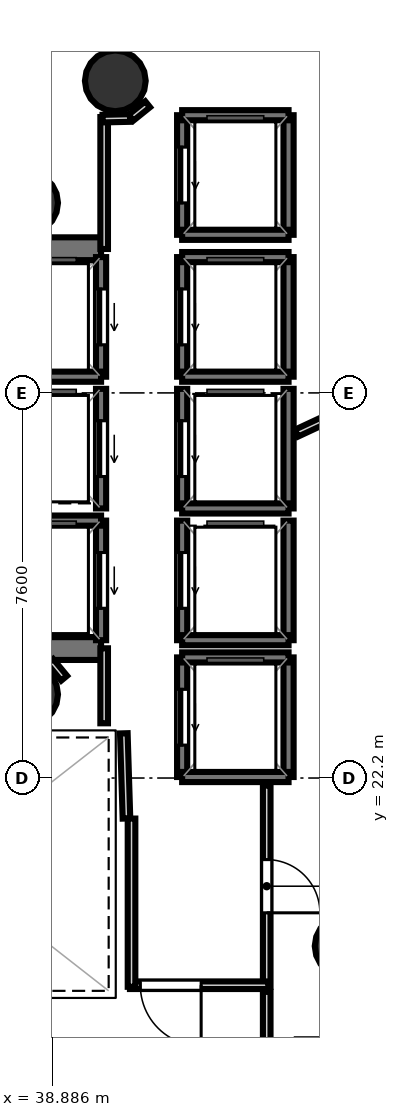
"""IFC4 building model, lengths in metres.
Left out: names, types, materials, properties, quantities, classifications, styles, units other than length and angle.
Written with IfcOpenShell. Run it as: python <this file> out.ifc"""

import sys

from ifc_helpers import new_model, si_unit, direction, frame, frame_2d, origin, origin_2d, place, context, subcontext, project, spatial, rectangle, hollow_circle, extrude, element, fill, save


model = new_model("IFC4")
c1 = context("Model", 3, precision=1e-05, world=origin(), true_north=direction((0.0, 1.0)))
c2 = subcontext(c1, "Body", "Model", "MODEL_VIEW")
j1 = project(units=[si_unit("LENGTHUNIT", "METRE"), si_unit("PLANEANGLEUNIT", "RADIAN")], contexts=[c1])
p1 = place(None, origin())
s1 = spatial("IfcSite", under=j1, at=p1, CompositionType="ELEMENT")
p2 = place(p1, origin())
s2 = spatial("IfcBuilding", under=s1, at=p2, CompositionType="ELEMENT")
p3 = place(p2, frame((0.0, 0.0, 229.9)))
s3 = spatial("IfcBuildingStorey", under=s2, at=p3, CompositionType="ELEMENT", Elevation=229.9)
p4 = place(p3, frame((29.33, 32.645, 0.0), z_axis=(0.0, 0.0, 1.0), x_axis=(1.0, 0.0, 0.0)))
e1 = element("IfcWall", 1, at=p4, inside=s3, PredefinedType="SHEAR", context=c2, shape_type="SweptSolid", body=[
    extrude(rectangle(XDim=10.52, YDim=0.45, at=frame_2d((5.26, 0.0))), origin(), (0.0, 0.0, 1.0), 4.38),
])
p5 = place(p4, frame((0.895, 0.0, 0.0)))
e2 = element("IfcOpeningElement", 2, at=p5, cuts=e1, PredefinedType="OPENING", context=c2, shape_type="SweptSolid", body=[
    extrude(rectangle(XDim=1.25, YDim=2.15, at=frame_2d((0.625, 1.075))), frame((0.0, 0.235, 0.0), z_axis=(0.0, -1.0, 0.0), x_axis=(1.0, 0.0, 0.0)), (0.0, 0.0, 1.0), 0.47),
])
p6 = place(p3, frame((29.33, 24.755, 0.0), z_axis=(0.0, 0.0, 1.0), x_axis=(1.0, 0.0, 0.0)))
e3 = element("IfcWall", 3, at=p6, inside=s3, PredefinedType="SHEAR", context=c2, shape_type="SweptSolid", body=[
    extrude(rectangle(XDim=10.52, YDim=0.45, at=frame_2d((5.26, 0.0))), origin(), (0.0, 0.0, 1.0), 4.38),
])
p7 = place(p6, frame((0.695, 0.0, 0.0)))
e4 = element("IfcOpeningElement", 4, at=p7, cuts=e3, PredefinedType="OPENING", context=c2, shape_type="SweptSolid", body=[
    extrude(rectangle(XDim=1.25, YDim=2.15, at=frame_2d((0.625, 1.075))), frame((0.0, 0.235, 0.0), z_axis=(0.0, -1.0, 0.0), x_axis=(1.0, 0.0, 0.0)), (0.0, 0.0, 1.0), 0.47),
])
for number, where, z_axis, x_axis in (
    (5, (38.4, 33.55, 0.0), (0.0, 0.0, 1.0), (1.0, 0.0, 0.0)),
    (6, (38.4, 23.85, 0.0), (0.0, 0.0, 1.0), (1.0, 0.0, 0.0)),
    (7, (40.131, 35.958, 0.0), (0.0, 0.0, 1.0), (1.0, 0.0, 0.0)),
    (8, (44.667, 18.883, 0.0), (0.0, 0.0, 1.0), (1.0, 0.0, 0.0)),
):
    element("IfcColumn", number, at=place(p3, frame(where, z_axis=z_axis, x_axis=x_axis)), inside=s3, PredefinedType="COLUMN", context=c2, shape_type="SweptSolid", body=[
        extrude(hollow_circle(Radius=0.6, WallThickness=0.03, at=origin_2d()), origin(), (0.0, 0.0, 1.0), 4.6),
    ])
p8 = place(p3, frame((39.85, 30.12, 0.0), z_axis=(0.0, 0.0, 1.0), x_axis=(0.0, 1.0, 0.0)))
e9 = element("IfcWall", 9, at=p8, inside=s3, PredefinedType="SOLIDWALL", context=c2, shape_type="SweptSolid", body=[
    extrude(rectangle(XDim=2.36, YDim=0.2, at=frame_2d((1.18, 0.0))), origin(), (0.0, 0.0, 1.0), 4.38),
])
p9 = place(p8, frame((0.63, 0.0, 0.0)))
e10 = element("IfcOpeningElement", 10, at=p9, cuts=e9, PredefinedType="OPENING", context=c2, shape_type="SweptSolid", body=[
    extrude(rectangle(XDim=1.1, YDim=2.15, at=frame_2d((0.55, 1.075))), frame((0.0, 0.11, 0.0), z_axis=(0.0, -1.0, 0.0), x_axis=(1.0, 0.0, 0.0)), (0.0, 0.0, 1.0), 0.22),
])
p10 = place(p3, frame((37.75, 30.12, 0.0), z_axis=(0.0, 0.0, 1.0), x_axis=(1.0, 0.0, 0.0)))
e11 = element("IfcWall", 11, at=p10, inside=s3, PredefinedType="SOLIDWALL", context=c2, shape_type="SweptSolid", body=[
    extrude(rectangle(XDim=2.1, YDim=0.2, at=frame_2d((1.05, 0.0))), origin(), (0.0, 0.0, 1.0), 4.38),
])
p11 = place(p3, frame((39.85, 24.92, 0.0), z_axis=(0.0, 0.0, 1.0), x_axis=(0.0, 1.0, 0.0)))
e12 = element("IfcWall", 12, at=p11, inside=s3, PredefinedType="SOLIDWALL", context=c2, shape_type="SweptSolid", body=[
    extrude(rectangle(XDim=2.36, YDim=0.2, at=frame_2d((1.18, 0.0))), origin(), (0.0, 0.0, 1.0), 4.38),
])
p12 = place(p11, frame((0.63, 0.0, 0.0)))
e13 = element("IfcOpeningElement", 13, at=p12, cuts=e12, PredefinedType="OPENING", context=c2, shape_type="SweptSolid", body=[
    extrude(rectangle(XDim=1.1, YDim=2.15, at=frame_2d((0.55, 1.075))), frame((0.0, 0.11, 0.0), z_axis=(0.0, -1.0, 0.0), x_axis=(1.0, 0.0, 0.0)), (0.0, 0.0, 1.0), 0.22),
])
p13 = place(p3, frame((37.75, 27.28, 0.0), z_axis=(0.0, 0.0, 1.0), x_axis=(1.0, 0.0, 0.0)))
e14 = element("IfcWall", 14, at=p13, inside=s3, PredefinedType="SOLIDWALL", context=c2, shape_type="SweptSolid", body=[
    extrude(rectangle(XDim=2.1, YDim=0.2, at=frame_2d((1.05, 0.0))), origin(), (0.0, 0.0, 1.0), 4.38),
])
p14 = place(p3, frame((43.55, 30.12, 0.0), z_axis=(0.0, 0.0, 1.0), x_axis=(0.0, 1.0, 0.0)))
e15 = element("IfcWall", 15, at=p14, inside=s3, PredefinedType="SOLIDWALL", context=c2, shape_type="SweptSolid", body=[
    extrude(rectangle(XDim=2.36, YDim=0.2, at=frame_2d((1.18, 0.0))), origin(), (0.0, 0.0, 1.0), 4.38),
])
p15 = place(p3, frame((41.45, 30.12, 0.0), z_axis=(0.0, 0.0, 1.0), x_axis=(0.0, 1.0, 0.0)))
e16 = element("IfcWall", 16, at=p15, inside=s3, PredefinedType="SOLIDWALL", context=c2, shape_type="SweptSolid", body=[
    extrude(rectangle(XDim=2.36, YDim=0.2, at=frame_2d((1.18, 0.0))), origin(), (0.0, 0.0, 1.0), 4.38),
])
p16 = place(p15, frame((0.63, 0.0, 0.0)))
e17 = element("IfcOpeningElement", 17, at=p16, cuts=e16, PredefinedType="OPENING", context=c2, shape_type="SweptSolid", body=[
    extrude(rectangle(XDim=1.1, YDim=2.15, at=frame_2d((0.55, 1.075))), frame((0.0, 0.11, 0.0), z_axis=(0.0, -1.0, 0.0), x_axis=(1.0, 0.0, 0.0)), (0.0, 0.0, 1.0), 0.22),
])
for number, where, z_axis, x_axis in (
    (18, (41.45, 32.48, 0.0), (0.0, 0.0, 1.0), (1.0, 0.0, 0.0)),
    (19, (41.45, 30.12, 0.0), (0.0, 0.0, 1.0), (1.0, 0.0, 0.0)),
):
    element("IfcWall", number, at=place(p3, frame(where, z_axis=z_axis, x_axis=x_axis)), inside=s3, PredefinedType="SOLIDWALL", context=c2, shape_type="SweptSolid", body=[
        extrude(rectangle(XDim=2.1, YDim=0.2, at=frame_2d((1.05, 0.0))), origin(), (0.0, 0.0, 1.0), 4.38),
    ])
p17 = place(p3, frame((43.55, 27.52, 0.0), z_axis=(0.0, 0.0, 1.0), x_axis=(0.0, 1.0, 0.0)))
e20 = element("IfcWall", 20, at=p17, inside=s3, PredefinedType="SOLIDWALL", context=c2, shape_type="SweptSolid", body=[
    extrude(rectangle(XDim=2.36, YDim=0.2, at=frame_2d((1.18, 0.0))), origin(), (0.0, 0.0, 1.0), 4.38),
])
p18 = place(p3, frame((41.45, 27.52, 0.0), z_axis=(0.0, 0.0, 1.0), x_axis=(0.0, 1.0, 0.0)))
e21 = element("IfcWall", 21, at=p18, inside=s3, PredefinedType="SOLIDWALL", context=c2, shape_type="SweptSolid", body=[
    extrude(rectangle(XDim=2.36, YDim=0.2, at=frame_2d((1.18, 0.0))), origin(), (0.0, 0.0, 1.0), 4.38),
])
p19 = place(p18, frame((0.63, 0.0, 0.0)))
e22 = element("IfcOpeningElement", 22, at=p19, cuts=e21, PredefinedType="OPENING", context=c2, shape_type="SweptSolid", body=[
    extrude(rectangle(XDim=1.1, YDim=2.15, at=frame_2d((0.55, 1.075))), frame((0.0, 0.11, 0.0), z_axis=(0.0, -1.0, 0.0), x_axis=(1.0, 0.0, 0.0)), (0.0, 0.0, 1.0), 0.22),
])
p20 = place(p3, frame((41.45, 27.52, 0.0), z_axis=(0.0, 0.0, 1.0), x_axis=(1.0, 0.0, 0.0)))
e23 = element("IfcWall", 23, at=p20, inside=s3, PredefinedType="SOLIDWALL", context=c2, shape_type="SweptSolid", body=[
    extrude(rectangle(XDim=2.1, YDim=0.2, at=frame_2d((1.05, 0.0))), origin(), (0.0, 0.0, 1.0), 4.38),
])
p21 = place(p3, frame((43.55, 24.92, 0.0), z_axis=(0.0, 0.0, 1.0), x_axis=(0.0, 1.0, 0.0)))
e24 = element("IfcWall", 24, at=p21, inside=s3, PredefinedType="SOLIDWALL", context=c2, shape_type="SweptSolid", body=[
    extrude(rectangle(XDim=2.36, YDim=0.2, at=frame_2d((1.18, 0.0))), origin(), (0.0, 0.0, 1.0), 4.38),
])
p22 = place(p3, frame((41.45, 24.92, 0.0), z_axis=(0.0, 0.0, 1.0), x_axis=(0.0, 1.0, 0.0)))
e25 = element("IfcWall", 25, at=p22, inside=s3, PredefinedType="SOLIDWALL", context=c2, shape_type="SweptSolid", body=[
    extrude(rectangle(XDim=2.36, YDim=0.2, at=frame_2d((1.18, 0.0))), origin(), (0.0, 0.0, 1.0), 4.38),
])
p23 = place(p22, frame((0.63, 0.0, 0.0)))
e26 = element("IfcOpeningElement", 26, at=p23, cuts=e25, PredefinedType="OPENING", context=c2, shape_type="SweptSolid", body=[
    extrude(rectangle(XDim=1.1, YDim=2.15, at=frame_2d((0.55, 1.075))), frame((0.0, 0.11, 0.0), z_axis=(0.0, -1.0, 0.0), x_axis=(1.0, 0.0, 0.0)), (0.0, 0.0, 1.0), 0.22),
])
p24 = place(p3, frame((41.45, 24.92, 0.0), z_axis=(0.0, 0.0, 1.0), x_axis=(1.0, 0.0, 0.0)))
e27 = element("IfcWall", 27, at=p24, inside=s3, PredefinedType="SOLIDWALL", context=c2, shape_type="SweptSolid", body=[
    extrude(rectangle(XDim=2.1, YDim=0.2, at=frame_2d((1.05, 0.0))), origin(), (0.0, 0.0, 1.0), 4.38),
])
p25 = place(p3, frame((39.85, 27.52, 0.0), z_axis=(0.0, 0.0, 1.0), x_axis=(0.0, 1.0, 0.0)))
e28 = element("IfcWall", 28, at=p25, inside=s3, PredefinedType="SOLIDWALL", context=c2, shape_type="SweptSolid", body=[
    extrude(rectangle(XDim=2.36, YDim=0.2, at=frame_2d((1.18, 0.0))), origin(), (0.0, 0.0, 1.0), 4.38),
])
p26 = place(p25, frame((0.63, 0.0, 0.0)))
e29 = element("IfcOpeningElement", 29, at=p26, cuts=e28, PredefinedType="OPENING", context=c2, shape_type="SweptSolid", body=[
    extrude(rectangle(XDim=1.1, YDim=2.15, at=frame_2d((0.55, 1.075))), frame((0.0, 0.11, 0.0), z_axis=(0.0, -1.0, 0.0), x_axis=(1.0, 0.0, 0.0)), (0.0, 0.0, 1.0), 0.22),
])
p27 = place(p3, frame((43.55, 22.22, 0.0), z_axis=(0.0, 0.0, 1.0), x_axis=(0.0, 1.0, 0.0)))
e30 = element("IfcWall", 30, at=p27, inside=s3, PredefinedType="SOLIDWALL", context=c2, shape_type="SweptSolid", body=[
    extrude(rectangle(XDim=2.36, YDim=0.2, at=frame_2d((1.18, 0.0))), origin(), (0.0, 0.0, 1.0), 4.38),
])
p28 = place(p3, frame((41.45, 22.22, 0.0), z_axis=(0.0, 0.0, 1.0), x_axis=(0.0, 1.0, 0.0)))
e31 = element("IfcWall", 31, at=p28, inside=s3, PredefinedType="SOLIDWALL", context=c2, shape_type="SweptSolid", body=[
    extrude(rectangle(XDim=2.36, YDim=0.2, at=frame_2d((1.18, 0.0))), origin(), (0.0, 0.0, 1.0), 4.38),
])
p29 = place(p28, frame((0.63, 0.0, 0.0)))
e32 = element("IfcOpeningElement", 32, at=p29, cuts=e31, PredefinedType="OPENING", context=c2, shape_type="SweptSolid", body=[
    extrude(rectangle(XDim=1.1, YDim=2.15, at=frame_2d((0.55, 1.075))), frame((0.0, 0.11, 0.0), z_axis=(0.0, -1.0, 0.0), x_axis=(1.0, 0.0, 0.0)), (0.0, 0.0, 1.0), 0.22),
])
for number, where, z_axis, x_axis in (
    (33, (41.45, 24.58, 0.0), (0.0, 0.0, 1.0), (1.0, 0.0, 0.0)),
    (34, (41.45, 22.22, 0.0), (0.0, 0.0, 1.0), (1.0, 0.0, 0.0)),
):
    element("IfcWall", number, at=place(p3, frame(where, z_axis=z_axis, x_axis=x_axis)), inside=s3, PredefinedType="SOLIDWALL", context=c2, shape_type="SweptSolid", body=[
        extrude(rectangle(XDim=2.1, YDim=0.2, at=frame_2d((1.05, 0.0))), origin(), (0.0, 0.0, 1.0), 4.38),
    ])
p30 = place(p3, frame((43.55, 32.92, 0.0), z_axis=(0.0, 0.0, 1.0), x_axis=(0.0, 1.0, 0.0)))
e35 = element("IfcWall", 35, at=p30, inside=s3, PredefinedType="SOLIDWALL", context=c2, shape_type="SweptSolid", body=[
    extrude(rectangle(XDim=2.36, YDim=0.2, at=frame_2d((1.18, 0.0))), origin(), (0.0, 0.0, 1.0), 4.38),
])
p31 = place(p3, frame((41.45, 32.92, 0.0), z_axis=(0.0, 0.0, 1.0), x_axis=(0.0, 1.0, 0.0)))
e36 = element("IfcWall", 36, at=p31, inside=s3, PredefinedType="SOLIDWALL", context=c2, shape_type="SweptSolid", body=[
    extrude(rectangle(XDim=2.36, YDim=0.2, at=frame_2d((1.18, 0.0))), origin(), (0.0, 0.0, 1.0), 4.38),
])
p32 = place(p31, frame((0.63, 0.0, 0.0)))
e37 = element("IfcOpeningElement", 37, at=p32, cuts=e36, PredefinedType="OPENING", context=c2, shape_type="SweptSolid", body=[
    extrude(rectangle(XDim=1.1, YDim=2.15, at=frame_2d((0.55, 1.075))), frame((0.0, 0.11, 0.0), z_axis=(0.0, -1.0, 0.0), x_axis=(1.0, 0.0, 0.0)), (0.0, 0.0, 1.0), 0.22),
])
for number, where, z_axis, x_axis in (
    (38, (41.45, 35.28, 0.0), (0.0, 0.0, 1.0), (1.0, 0.0, 0.0)),
    (39, (41.45, 32.92, 0.0), (0.0, 0.0, 1.0), (1.0, 0.0, 0.0)),
):
    element("IfcWall", number, at=place(p3, frame(where, z_axis=z_axis, x_axis=x_axis)), inside=s3, PredefinedType="SOLIDWALL", context=c2, shape_type="SweptSolid", body=[
        extrude(rectangle(XDim=2.1, YDim=0.2, at=frame_2d((1.05, 0.0))), origin(), (0.0, 0.0, 1.0), 4.38),
    ])
p33 = place(p3, frame((40.351, 21.401, 0.0), z_axis=(0.0, 0.0, 1.0), x_axis=(-0.031058045979, 0.999517582527, 0.0)))
e40 = element("IfcWall", 40, at=p33, inside=s3, PredefinedType="PARTITIONING", context=c2, shape_type="SweptSolid", body=[
    extrude(rectangle(XDim=1.682, YDim=0.15, at=frame_2d((0.841, 0.0))), origin(), (0.0, 0.0, 1.0), 2.9),
])
p34 = place(p3, frame((39.911, 23.28, 0.0), z_axis=(0.0, 0.0, 1.0), x_axis=(0.0, 1.0, 0.0)))
e41 = element("IfcWall", 41, at=p34, inside=s3, PredefinedType="PARTITIONING", context=c2, shape_type="SweptSolid", body=[
    extrude(rectangle(XDim=1.48, YDim=0.15, at=frame_2d((0.74, 0.0))), origin(), (0.0, 0.0, 1.0), 2.9),
])
p35 = place(p3, frame((39.911, 32.64, 0.0), z_axis=(0.0, 0.0, 1.0), x_axis=(0.0, 1.0, 0.0)))
e42 = element("IfcWall", 42, at=p35, inside=s3, PredefinedType="PARTITIONING", context=c2, shape_type="SweptSolid", body=[
    extrude(rectangle(XDim=2.604, YDim=0.15, at=frame_2d((1.302, 0.0))), origin(), (0.0, 0.0, 1.0), 2.9),
])
p36 = place(p3, frame((39.881, 35.213, 0.0), z_axis=(0.0, 0.0, 1.0), x_axis=(0.999756500784, 0.02206669754, 0.0)))
e43 = element("IfcWall", 43, at=p36, inside=s3, PredefinedType="PARTITIONING", context=c2, shape_type="SweptSolid", body=[
    extrude(rectangle(XDim=0.542, YDim=0.15, at=frame_2d((0.271, 0.0))), origin(), (0.0, 0.0, 1.0), 2.9),
])
p37 = place(p3, frame((40.441, 35.232, 0.0), z_axis=(0.0, 0.0, 1.0), x_axis=(0.778714564707, 0.627378376033, 0.0)))
e44 = element("IfcWall", 44, at=p37, inside=s3, PredefinedType="PARTITIONING", context=c2, shape_type="SweptSolid", body=[
    extrude(rectangle(XDim=0.421, YDim=0.15, at=frame_2d((0.21, 0.0))), origin(), (0.0, 0.0, 1.0), 2.9),
])
p38 = place(p3, frame((43.119, 22.05, 0.0), z_axis=(0.0, 0.0, 1.0), x_axis=(0.0, -1.0, 0.0)))
e45 = element("IfcWall", 45, at=p38, inside=s3, PredefinedType="PARTITIONING", context=c2, shape_type="SweptSolid", body=[
    extrude(rectangle(XDim=3.97, YDim=0.15, at=frame_2d((1.985, 0.0))), origin(), (0.0, 0.0, 1.0), 2.9),
])
p39 = place(p38, frame((1.46, 0.0, 0.0)))
e46 = element("IfcOpeningElement", 46, at=p39, cuts=e45, PredefinedType="OPENING", context=c2, shape_type="SweptSolid", body=[
    extrude(rectangle(XDim=1.05, YDim=2.15, at=frame_2d((0.525, 1.075))), frame((0.0, 0.085, 0.0), z_axis=(0.0, -1.0, 0.0), x_axis=(1.0, 0.0, 0.0)), (0.0, 0.0, 1.0), 0.17),
])
p40 = place(p3, frame((43.15, 18.111, 0.0), z_axis=(0.0, 0.0, 1.0), x_axis=(-1.0, 0.0, 0.0)))
e47 = element("IfcWall", 47, at=p40, inside=s3, PredefinedType="PARTITIONING", context=c2, shape_type="SweptSolid", body=[
    extrude(rectangle(XDim=2.73, YDim=0.15, at=frame_2d((1.365, 0.0))), origin(), (0.0, 0.0, 1.0), 2.9),
])
p41 = place(p40, frame((1.325, 0.0, 0.0)))
e48 = element("IfcOpeningElement", 48, at=p41, cuts=e47, PredefinedType="OPENING", context=c2, shape_type="SweptSolid", body=[
    extrude(rectangle(XDim=1.2, YDim=2.15, at=frame_2d((0.6, 1.075))), frame((0.0, 0.085, 0.0), z_axis=(0.0, -1.0, 0.0), x_axis=(1.0, 0.0, 0.0)), (0.0, 0.0, 1.0), 0.17),
])
p42 = place(p3, frame((40.451, 18.08, 0.0), z_axis=(0.0, 0.0, 1.0), x_axis=(0.0, 1.0, 0.0)))
e49 = element("IfcWall", 49, at=p42, inside=s3, PredefinedType="PARTITIONING", context=c2, shape_type="SweptSolid", body=[
    extrude(rectangle(XDim=3.32, YDim=0.15, at=frame_2d((1.66, 0.0))), origin(), (0.0, 0.0, 1.0), 2.9),
])
p43 = place(p3, frame((39.121, 24.17, 0.0), z_axis=(0.0, 0.0, 1.0), x_axis=(-0.638008265708, 0.770029514296, 0.0)))
e50 = element("IfcWall", 50, at=p43, inside=s3, PredefinedType="PARTITIONING", context=c2, shape_type="SweptSolid", body=[
    extrude(rectangle(XDim=0.431, YDim=0.15, at=frame_2d((0.215, 0.0))), origin(), (0.0, 0.0, 1.0), 2.9),
])
p44 = place(p3, frame((43.119, 17.98, 0.0), z_axis=(0.0, 0.0, 1.0), x_axis=(0.0, -1.0, 0.0)))
e51 = element("IfcWall", 51, at=p44, inside=s3, PredefinedType="PARTITIONING", context=c2, shape_type="SweptSolid", body=[
    extrude(rectangle(XDim=2.518, YDim=0.15, at=frame_2d((1.259, 0.0))), origin(), (0.0, 0.0, 1.0), 2.9),
])
p45 = place(p3, frame((57.594, 35.481, 0.0), z_axis=(0.0, 0.0, 1.0), x_axis=(-0.906310912914, -0.42261155821, 0.0)))
e52 = element("IfcWall", 52, at=p45, inside=s3, PredefinedType="PARTITIONING", context=c2, shape_type="SweptSolid", body=[
    extrude(rectangle(XDim=15.323, YDim=0.15, at=frame_2d((7.661, 0.0))), origin(), (0.0, 0.0, 1.0), 2.9),
])
p46 = place(p9, origin())
e53 = element("IfcDoor", 53, at=p46, inside=s3, OperationType="SLIDING_TO_LEFT", PredefinedType="DOOR", context=c2, shape_type="SweptSolid", body=[
    extrude(rectangle(XDim=1.1, YDim=2.15, at=frame_2d((0.55, 1.075))), frame((0.0, 0.025, 0.0), z_axis=(0.0, -1.0, 0.0), x_axis=(1.0, 0.0, 0.0)), (0.0, 0.0, 1.0), 0.05),
])
fill(e10, e53)
p47 = place(p12, origin())
e54 = element("IfcDoor", 54, at=p47, inside=s3, OperationType="SLIDING_TO_LEFT", PredefinedType="DOOR", context=c2, shape_type="SweptSolid", body=[
    extrude(rectangle(XDim=1.1, YDim=2.15, at=frame_2d((0.55, 1.075))), frame((0.0, 0.025, 0.0), z_axis=(0.0, -1.0, 0.0), x_axis=(1.0, 0.0, 0.0)), (0.0, 0.0, 1.0), 0.05),
])
fill(e13, e54)
p48 = place(p16, origin())
e55 = element("IfcDoor", 55, at=p48, inside=s3, OperationType="SLIDING_TO_LEFT", PredefinedType="DOOR", context=c2, shape_type="SweptSolid", body=[
    extrude(rectangle(XDim=1.1, YDim=2.15, at=frame_2d((0.55, 1.075))), frame((0.0, 0.025, 0.0), z_axis=(0.0, -1.0, 0.0), x_axis=(1.0, 0.0, 0.0)), (0.0, 0.0, 1.0), 0.05),
])
fill(e17, e55)
p49 = place(p19, origin())
e56 = element("IfcDoor", 56, at=p49, inside=s3, OperationType="SLIDING_TO_LEFT", PredefinedType="DOOR", context=c2, shape_type="SweptSolid", body=[
    extrude(rectangle(XDim=1.1, YDim=2.15, at=frame_2d((0.55, 1.075))), frame((0.0, 0.025, 0.0), z_axis=(0.0, -1.0, 0.0), x_axis=(1.0, 0.0, 0.0)), (0.0, 0.0, 1.0), 0.05),
])
fill(e22, e56)
p50 = place(p23, origin())
e57 = element("IfcDoor", 57, at=p50, inside=s3, OperationType="SLIDING_TO_LEFT", PredefinedType="DOOR", context=c2, shape_type="SweptSolid", body=[
    extrude(rectangle(XDim=1.1, YDim=2.15, at=frame_2d((0.55, 1.075))), frame((0.0, 0.025, 0.0), z_axis=(0.0, -1.0, 0.0), x_axis=(1.0, 0.0, 0.0)), (0.0, 0.0, 1.0), 0.05),
])
fill(e26, e57)
p51 = place(p26, origin())
e58 = element("IfcDoor", 58, at=p51, inside=s3, OperationType="SLIDING_TO_LEFT", PredefinedType="DOOR", context=c2, shape_type="SweptSolid", body=[
    extrude(rectangle(XDim=1.1, YDim=2.15, at=frame_2d((0.55, 1.075))), frame((0.0, 0.025, 0.0), z_axis=(0.0, -1.0, 0.0), x_axis=(1.0, 0.0, 0.0)), (0.0, 0.0, 1.0), 0.05),
])
fill(e29, e58)
p52 = place(p29, origin())
e59 = element("IfcDoor", 59, at=p52, inside=s3, OperationType="SLIDING_TO_LEFT", PredefinedType="DOOR", context=c2, shape_type="SweptSolid", body=[
    extrude(rectangle(XDim=1.1, YDim=2.15, at=frame_2d((0.55, 1.075))), frame((0.0, 0.025, 0.0), z_axis=(0.0, -1.0, 0.0), x_axis=(1.0, 0.0, 0.0)), (0.0, 0.0, 1.0), 0.05),
])
fill(e32, e59)
p53 = place(p32, origin())
e60 = element("IfcDoor", 60, at=p53, inside=s3, OperationType="SLIDING_TO_LEFT", PredefinedType="DOOR", context=c2, shape_type="SweptSolid", body=[
    extrude(rectangle(XDim=1.1, YDim=2.15, at=frame_2d((0.55, 1.075))), frame((0.0, 0.025, 0.0), z_axis=(0.0, -1.0, 0.0), x_axis=(1.0, 0.0, 0.0)), (0.0, 0.0, 1.0), 0.05),
])
fill(e37, e60)
p54 = place(p41, origin())
e61 = element("IfcDoor", 61, at=p54, inside=s3, OperationType="SINGLE_SWING_LEFT", PredefinedType="DOOR", context=c2, shape_type="SweptSolid", body=[
    extrude(rectangle(XDim=1.2, YDim=2.15, at=frame_2d((0.6, 1.075))), frame((0.0, 0.025, 0.0), z_axis=(0.0, -1.0, 0.0), x_axis=(1.0, 0.0, 0.0)), (0.0, 0.0, 1.0), 0.05),
])
fill(e48, e61)
p55 = place(p39, origin())
e62 = element("IfcDoor", 62, at=p55, inside=s3, OperationType="SINGLE_SWING_RIGHT", PredefinedType="DOOR", context=c2, shape_type="SweptSolid", body=[
    extrude(rectangle(XDim=1.05, YDim=2.15, at=frame_2d((0.525, 1.075))), frame((0.0, 0.025, 0.0), z_axis=(0.0, -1.0, 0.0), x_axis=(1.0, 0.0, 0.0)), (0.0, 0.0, 1.0), 0.05),
])
fill(e46, e62)
save(model, sys.argv[1])
